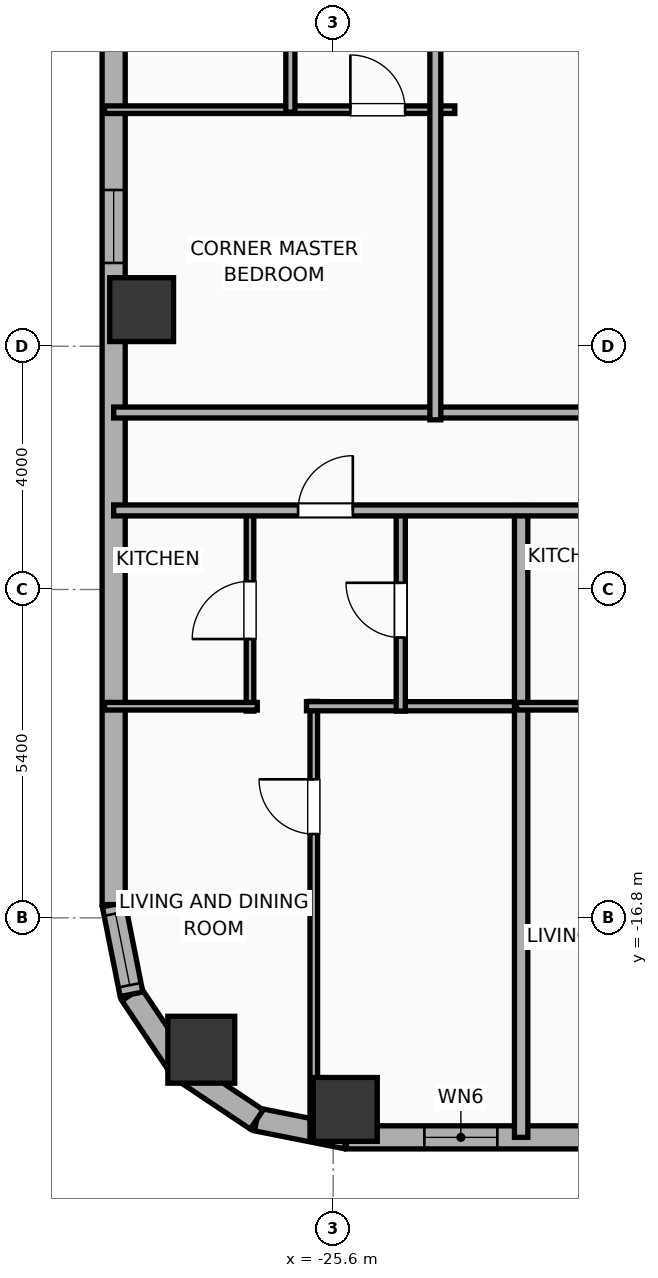
"""IFC4 building model, lengths in metres.
Left out: names, types, materials, properties, quantities, classifications, styles, units other than length and angle.
Written with IfcOpenShell. Run it as: python <this file> out.ifc"""

import sys

from ifc_helpers import new_model, si_unit, direction, frame, frame_2d, origin, origin_2d, place, context, subcontext, project, spatial, rectangle, hollow_rectangle, hollow_circle, extrude, element, fill, save


model = new_model("IFC4")
c1 = context("Model", 3, precision=1e-05, world=origin(), true_north=direction((0.0, 1.0)))
c2 = subcontext(c1, "Body", "Model", "MODEL_VIEW")
j1 = project(units=[si_unit("LENGTHUNIT", "METRE"), si_unit("PLANEANGLEUNIT", "RADIAN")], contexts=[c1])
p1 = place(None, origin())
s1 = spatial("IfcSite", under=j1, at=p1, CompositionType="ELEMENT")
p2 = place(p1, origin())
s2 = spatial("IfcBuilding", under=s1, at=p2, CompositionType="ELEMENT")
p3 = place(p2, frame((0.0, 0.0, 105.3)))
s3 = spatial("IfcBuildingStorey", under=s2, at=p3, CompositionType="ELEMENT", Elevation=105.3)
for number, where, z_axis, x_axis in (
    (1, (-25.4, -19.95, 0.0), (0.0, 0.0, 1.0), (1.0, 0.0, 0.0)),
    (2, (-28.75, -6.798, 0.0), (0.0, 0.0, 1.0), (1.0, 0.0, 0.0)),
):
    element("IfcColumn", number, at=place(p3, frame(where, z_axis=z_axis, x_axis=x_axis)), inside=s3, PredefinedType="COLUMN", context=c2, shape_type="SweptSolid", body=[
        extrude(hollow_rectangle(XDim=1.05, YDim=1.05, WallThickness=0.036, at=origin_2d()), origin(), (0.0, 0.0, 1.0), 3.9),
    ])
p4 = place(p3, frame((-27.769, -18.969, 0.0), z_axis=(0.0, 0.0, 1.0), x_axis=(1.0, 0.0, 0.0)))
e3 = element("IfcColumn", 3, at=p4, inside=s3, PredefinedType="COLUMN", context=c2, shape_type="SweptSolid", body=[
    extrude(hollow_circle(Radius=0.55, WallThickness=0.036, at=origin_2d()), origin(), (0.0, 0.0, 1.0), 3.9),
])
p5 = place(p3, frame((29.381, -20.41, 0.0), z_axis=(0.0, 0.0, 1.0), x_axis=(-1.0, 0.0, 0.0)))
e4 = element("IfcWall", 4, at=p5, inside=s3, PredefinedType="ELEMENTEDWALL", context=c2, shape_type="SweptSolid", body=[
    extrude(rectangle(XDim=54.763, YDim=0.38, at=frame_2d((27.381, 0.0))), origin(), (0.0, 0.0, 1.0), 3.65),
])
p6 = place(p5, frame((6.495, 0.0, 0.75)))
e5 = element("IfcOpeningElement", 5, at=p6, cuts=e4, PredefinedType="OPENING", context=c2, shape_type="SweptSolid", body=[
    extrude(rectangle(XDim=2.4, YDim=2.1, at=frame_2d((1.2, 1.05))), frame((0.0, 0.2, 0.0), z_axis=(0.0, -1.0, 0.0), x_axis=(1.0, 0.0, 0.0)), (0.0, 0.0, 1.0), 0.4),
])
p7 = place(p5, frame((17.686, 0.0, 0.75)))
e6 = element("IfcOpeningElement", 6, at=p7, cuts=e4, PredefinedType="OPENING", context=c2, shape_type="SweptSolid", body=[
    extrude(rectangle(XDim=2.4, YDim=2.1, at=frame_2d((1.2, 1.05))), frame((0.0, 0.2, 0.0), z_axis=(0.0, -1.0, 0.0), x_axis=(1.0, 0.0, 0.0)), (0.0, 0.0, 1.0), 0.4),
])
p8 = place(p5, frame((34.677, 0.0, 0.75)))
e7 = element("IfcOpeningElement", 7, at=p8, cuts=e4, PredefinedType="OPENING", context=c2, shape_type="SweptSolid", body=[
    extrude(rectangle(XDim=2.4, YDim=2.1, at=frame_2d((1.2, 1.05))), frame((0.0, 0.2, 0.0), z_axis=(0.0, -1.0, 0.0), x_axis=(1.0, 0.0, 0.0)), (0.0, 0.0, 1.0), 0.4),
])
p9 = place(p5, frame((45.867, 0.0, 0.75)))
e8 = element("IfcOpeningElement", 8, at=p9, cuts=e4, PredefinedType="OPENING", context=c2, shape_type="SweptSolid", body=[
    extrude(rectangle(XDim=2.4, YDim=2.1, at=frame_2d((1.2, 1.05))), frame((0.0, 0.2, 0.0), z_axis=(0.0, -1.0, 0.0), x_axis=(1.0, 0.0, 0.0)), (0.0, 0.0, 1.0), 0.4),
])
p10 = place(p5, frame((52.281, 0.0, 0.75)))
e9 = element("IfcOpeningElement", 9, at=p10, cuts=e4, PredefinedType="OPENING", context=c2, shape_type="SweptSolid", body=[
    extrude(rectangle(XDim=1.2, YDim=2.05, at=frame_2d((0.6, 1.025))), frame((0.0, 0.2, 0.0), z_axis=(0.0, -1.0, 0.0), x_axis=(1.0, 0.0, 0.0)), (0.0, 0.0, 1.0), 0.4),
])
p11 = place(p5, frame((49.641, 0.0, 0.75)))
e10 = element("IfcOpeningElement", 10, at=p11, cuts=e4, PredefinedType="OPENING", context=c2, shape_type="SweptSolid", body=[
    extrude(rectangle(XDim=1.2, YDim=2.05, at=frame_2d((0.6, 1.025))), frame((0.0, 0.2, 0.0), z_axis=(0.0, -1.0, 0.0), x_axis=(1.0, 0.0, 0.0)), (0.0, 0.0, 1.0), 0.4),
])
p12 = place(p5, frame((39.543, 0.0, 0.75)))
e11 = element("IfcOpeningElement", 11, at=p12, cuts=e4, PredefinedType="OPENING", context=c2, shape_type="SweptSolid", body=[
    extrude(rectangle(XDim=1.2, YDim=2.05, at=frame_2d((0.6, 1.025))), frame((0.0, 0.2, 0.0), z_axis=(0.0, -1.0, 0.0), x_axis=(1.0, 0.0, 0.0)), (0.0, 0.0, 1.0), 0.4),
])
p13 = place(p5, frame((44.538, 0.0, 0.75)))
e12 = element("IfcOpeningElement", 12, at=p13, cuts=e4, PredefinedType="OPENING", context=c2, shape_type="SweptSolid", body=[
    extrude(rectangle(XDim=0.52, YDim=2.05, at=frame_2d((0.26, 1.025))), frame((0.0, 0.2, 0.0), z_axis=(0.0, -1.0, 0.0), x_axis=(1.0, 0.0, 0.0)), (0.0, 0.0, 1.0), 0.4),
])
p14 = place(p5, frame((28.206, 0.0, 0.75)))
e13 = element("IfcOpeningElement", 13, at=p14, cuts=e4, PredefinedType="OPENING", context=c2, shape_type="SweptSolid", body=[
    extrude(rectangle(XDim=1.2, YDim=2.05, at=frame_2d((0.6, 1.025))), frame((0.0, 0.2, 0.0), z_axis=(0.0, -1.0, 0.0), x_axis=(1.0, 0.0, 0.0)), (0.0, 0.0, 1.0), 0.4),
])
p15 = place(p5, frame((31.241, 0.0, 0.75)))
e14 = element("IfcOpeningElement", 14, at=p15, cuts=e4, PredefinedType="OPENING", context=c2, shape_type="SweptSolid", body=[
    extrude(rectangle(XDim=0.85, YDim=2.05, at=frame_2d((0.425, 1.025))), frame((0.0, 0.2, 0.0), z_axis=(0.0, -1.0, 0.0), x_axis=(1.0, 0.0, 0.0)), (0.0, 0.0, 1.0), 0.4),
])
p16 = place(p5, frame((24.561, 0.0, 0.75)))
e15 = element("IfcOpeningElement", 15, at=p16, cuts=e4, PredefinedType="OPENING", context=c2, shape_type="SweptSolid", body=[
    extrude(rectangle(XDim=1.2, YDim=2.05, at=frame_2d((0.6, 1.025))), frame((0.0, 0.2, 0.0), z_axis=(0.0, -1.0, 0.0), x_axis=(1.0, 0.0, 0.0)), (0.0, 0.0, 1.0), 0.4),
])
p17 = place(p5, frame((22.561, 0.0, 0.75)))
e16 = element("IfcOpeningElement", 16, at=p17, cuts=e4, PredefinedType="OPENING", context=c2, shape_type="SweptSolid", body=[
    extrude(rectangle(XDim=0.52, YDim=2.05, at=frame_2d((0.26, 1.025))), frame((0.0, 0.2, 0.0), z_axis=(0.0, -1.0, 0.0), x_axis=(1.0, 0.0, 0.0)), (0.0, 0.0, 1.0), 0.4),
])
p18 = place(p5, frame((13.886, 0.0, 0.75)))
e17 = element("IfcOpeningElement", 17, at=p18, cuts=e4, PredefinedType="OPENING", context=c2, shape_type="SweptSolid", body=[
    extrude(rectangle(XDim=1.2, YDim=2.05, at=frame_2d((0.6, 1.025))), frame((0.0, 0.2, 0.0), z_axis=(0.0, -1.0, 0.0), x_axis=(1.0, 0.0, 0.0)), (0.0, 0.0, 1.0), 0.4),
])
p19 = place(p5, frame((11.694, 0.0, 0.75)))
e18 = element("IfcOpeningElement", 18, at=p19, cuts=e4, PredefinedType="OPENING", context=c2, shape_type="SweptSolid", body=[
    extrude(rectangle(XDim=0.85, YDim=2.05, at=frame_2d((0.425, 1.025))), frame((0.0, 0.2, 0.0), z_axis=(0.0, -1.0, 0.0), x_axis=(1.0, 0.0, 0.0)), (0.0, 0.0, 1.0), 0.4),
])
p20 = place(p5, frame((3.286, 0.0, 0.75)))
e19 = element("IfcOpeningElement", 19, at=p20, cuts=e4, PredefinedType="OPENING", context=c2, shape_type="SweptSolid", body=[
    extrude(rectangle(XDim=1.2, YDim=2.05, at=frame_2d((0.6, 1.025))), frame((0.0, 0.2, 0.0), z_axis=(0.0, -1.0, 0.0), x_axis=(1.0, 0.0, 0.0)), (0.0, 0.0, 1.0), 0.4),
])
p21 = place(p5, frame((0.816, 0.0, 0.75)))
e20 = element("IfcOpeningElement", 20, at=p21, cuts=e4, PredefinedType="OPENING", context=c2, shape_type="SweptSolid", body=[
    extrude(rectangle(XDim=1.2, YDim=2.05, at=frame_2d((0.6, 1.025))), frame((0.0, 0.2, 0.0), z_axis=(0.0, -1.0, 0.0), x_axis=(1.0, 0.0, 0.0)), (0.0, 0.0, 1.0), 0.4),
])
p22 = place(p3, frame((-25.381, -20.41, 0.0), z_axis=(0.0, 0.0, 1.0), x_axis=(-0.980786132421, 0.195086038585, 0.0)))
e21 = element("IfcWall", 21, at=p22, inside=s3, PredefinedType="ELEMENTEDWALL", context=c2, shape_type="SweptSolid", body=[
    extrude(rectangle(XDim=1.504, YDim=0.38, at=frame_2d((0.752, 0.0))), origin(), (0.0, 0.0, 1.0), 3.65),
])
p23 = place(p3, frame((-26.857, -20.116, 0.0), z_axis=(0.0, 0.0, 1.0), x_axis=(-0.831468045563, 0.555572577804, 0.0)))
e22 = element("IfcWall", 22, at=p23, inside=s3, PredefinedType="ELEMENTEDWALL", context=c2, shape_type="SweptSolid", body=[
    extrude(rectangle(XDim=1.485, YDim=0.38, at=frame_2d((0.742, 0.0))), origin(), (0.0, 0.0, 1.0), 3.65),
])
p24 = place(p3, frame((-28.091, -19.292, 0.0), z_axis=(0.0, 0.0, 1.0), x_axis=(-0.555610286119, 0.831442848281, 0.0)))
e23 = element("IfcWall", 23, at=p24, inside=s3, PredefinedType="ELEMENTEDWALL", context=c2, shape_type="SweptSolid", body=[
    extrude(rectangle(XDim=1.485, YDim=0.38, at=frame_2d((0.743, 0.0))), origin(), (0.0, 0.0, 1.0), 3.65),
])
p25 = place(p3, frame((-28.917, -18.057, 0.0), z_axis=(0.0, 0.0, 1.0), x_axis=(-0.195086038585, 0.980786132421, 0.0)))
e24 = element("IfcWall", 24, at=p25, inside=s3, PredefinedType="ELEMENTEDWALL", context=c2, shape_type="SweptSolid", body=[
    extrude(rectangle(XDim=1.504, YDim=0.38, at=frame_2d((0.752, 0.0))), origin(), (0.0, 0.0, 1.0), 3.65),
])
p26 = place(p25, frame((0.152, 0.0, 0.75)))
e25 = element("IfcOpeningElement", 25, at=p26, cuts=e24, PredefinedType="OPENING", context=c2, shape_type="SweptSolid", body=[
    extrude(rectangle(XDim=1.2, YDim=2.05, at=frame_2d((0.6, 1.025))), frame((0.0, 0.2, 0.0), z_axis=(0.0, -1.0, 0.0), x_axis=(1.0, 0.0, 0.0)), (0.0, 0.0, 1.0), 0.4),
])
p27 = place(p3, frame((-29.21, -16.581, 0.0), z_axis=(0.0, 0.0, 1.0), x_axis=(0.0, 1.0, 0.0)))
e26 = element("IfcWall", 26, at=p27, inside=s3, PredefinedType="ELEMENTEDWALL", context=c2, shape_type="SweptSolid", body=[
    extrude(rectangle(XDim=34.363, YDim=0.38, at=frame_2d((17.181, 0.0))), origin(), (0.0, 0.0, 1.0), 3.65),
])
p28 = place(p27, frame((31.087, 0.0, 0.75)))
e27 = element("IfcOpeningElement", 27, at=p28, cuts=e26, PredefinedType="OPENING", context=c2, shape_type="SweptSolid", body=[
    extrude(rectangle(XDim=1.2, YDim=2.05, at=frame_2d((0.6, 1.025))), frame((0.0, 0.2, 0.0), z_axis=(0.0, -1.0, 0.0), x_axis=(1.0, 0.0, 0.0)), (0.0, 0.0, 1.0), 0.4),
])
p29 = place(p27, frame((21.626, 0.0, 0.75)))
e28 = element("IfcOpeningElement", 28, at=p29, cuts=e26, PredefinedType="OPENING", context=c2, shape_type="SweptSolid", body=[
    extrude(rectangle(XDim=1.2, YDim=2.05, at=frame_2d((0.6, 1.025))), frame((0.0, 0.2, 0.0), z_axis=(0.0, -1.0, 0.0), x_axis=(1.0, 0.0, 0.0)), (0.0, 0.0, 1.0), 0.4),
])
p30 = place(p27, frame((10.551, 0.0, 0.75)))
e29 = element("IfcOpeningElement", 29, at=p30, cuts=e26, PredefinedType="OPENING", context=c2, shape_type="SweptSolid", body=[
    extrude(rectangle(XDim=1.2, YDim=2.05, at=frame_2d((0.6, 1.025))), frame((0.0, 0.2, 0.0), z_axis=(0.0, -1.0, 0.0), x_axis=(1.0, 0.0, 0.0)), (0.0, 0.0, 1.0), 0.4),
])
p31 = place(p3, frame((-29.21, -8.49, 0.0), z_axis=(0.0, 0.0, 1.0), x_axis=(1.0, 0.0, 0.0)))
e30 = element("IfcWall", 30, at=p31, inside=s3, PredefinedType="PARTITIONING", context=c2, shape_type="SweptSolid", body=[
    extrude(rectangle(XDim=19.33, YDim=0.18, at=frame_2d((9.665, 0.0))), origin(), (0.0, 0.0, 1.0), 3.65),
])
p32 = place(p3, frame((-25.919, -20.456, 0.0), z_axis=(0.0, 0.0, 1.0), x_axis=(0.0, 1.0, 0.0)))
e31 = element("IfcWall", 31, at=p32, inside=s3, PredefinedType="PARTITIONING", context=c2, shape_type="SweptSolid", body=[
    extrude(rectangle(XDim=7.216, YDim=0.125, at=frame_2d((3.608, 0.0))), origin(), (0.0, 0.0, 1.0), 3.65),
])
p33 = place(p32, frame((5.034, 0.0, 0.0)))
e32 = element("IfcOpeningElement", 32, at=p33, cuts=e31, PredefinedType="OPENING", context=c2, shape_type="SweptSolid", body=[
    extrude(rectangle(XDim=0.9, YDim=2.05, at=frame_2d((0.45, 1.025))), frame((0.0, 0.073, 0.0), z_axis=(0.0, -1.0, 0.0), x_axis=(1.0, 0.0, 0.0)), (0.0, 0.0, 1.0), 0.145),
])
p34 = place(p3, frame((-26.039, -13.32, 0.0), z_axis=(0.0, 0.0, 1.0), x_axis=(1.0, 0.0, 0.0)))
e33 = element("IfcWall", 33, at=p34, inside=s3, PredefinedType="PLUMBINGWALL", context=c2, shape_type="SweptSolid", body=[
    extrude(rectangle(XDim=3.605, YDim=0.15, at=frame_2d((1.802, 0.0))), origin(), (0.0, 0.0, 1.0), 3.65),
])
p35 = place(p3, frame((-26.968, -13.4, 0.0), z_axis=(0.0, 0.0, 1.0), x_axis=(0.0, 1.0, 0.0)))
e34 = element("IfcWall", 34, at=p35, inside=s3, PredefinedType="PARTITIONING", context=c2, shape_type="SweptSolid", body=[
    extrude(rectangle(XDim=3.32, YDim=0.125, at=frame_2d((1.66, 0.0))), origin(), (0.0, 0.0, 1.0), 3.65),
])
p36 = place(p35, frame((1.185, 0.0, 0.0)))
e35 = element("IfcOpeningElement", 35, at=p36, cuts=e34, PredefinedType="OPENING", context=c2, shape_type="SweptSolid", body=[
    extrude(rectangle(XDim=0.95, YDim=2.05, at=frame_2d((0.475, 1.025))), frame((0.0, 0.073, 0.0), z_axis=(0.0, -1.0, 0.0), x_axis=(1.0, 0.0, 0.0)), (0.0, 0.0, 1.0), 0.145),
])
p37 = place(p3, frame((-29.36, -13.32, 0.0), z_axis=(0.0, 0.0, 1.0), x_axis=(1.0, 0.0, 0.0)))
e36 = element("IfcWall", 36, at=p37, inside=s3, PredefinedType="PARTITIONING", context=c2, shape_type="SweptSolid", body=[
    extrude(rectangle(XDim=2.512, YDim=0.125, at=frame_2d((1.256, 0.0))), origin(), (0.0, 0.0, 1.0), 3.65),
])
p38 = place(p3, frame((-24.489, -13.4, 0.0), z_axis=(0.0, 0.0, 1.0), x_axis=(0.0, 1.0, 0.0)))
e37 = element("IfcWall", 37, at=p38, inside=s3, PredefinedType="PLUMBINGWALL", context=c2, shape_type="SweptSolid", body=[
    extrude(rectangle(XDim=3.32, YDim=0.15, at=frame_2d((1.66, 0.0))), origin(), (0.0, 0.0, 1.0), 3.65),
])
p39 = place(p38, frame((1.21, 0.0, 0.0)))
e38 = element("IfcOpeningElement", 38, at=p39, cuts=e37, PredefinedType="OPENING", context=c2, shape_type="SweptSolid", body=[
    extrude(rectangle(XDim=0.9, YDim=2.05, at=frame_2d((0.45, 1.025))), frame((0.0, 0.085, 0.0), z_axis=(0.0, -1.0, 0.0), x_axis=(1.0, 0.0, 0.0)), (0.0, 0.0, 1.0), 0.17),
])
p40 = place(p3, frame((-22.509, -20.41, 0.0), z_axis=(0.0, 0.0, 1.0), x_axis=(0.0, 1.0, 0.0)))
e39 = element("IfcWall", 39, at=p40, inside=s3, PredefinedType="PARTITIONING", context=c2, shape_type="SweptSolid", body=[
    extrude(rectangle(XDim=10.39, YDim=0.22, at=frame_2d((5.195, 0.0))), origin(), (0.0, 0.0, 1.0), 3.65),
])
p41 = place(p3, frame((-22.584, -13.32, 0.0), z_axis=(0.0, 0.0, 1.0), x_axis=(1.0, 0.0, 0.0)))
e40 = element("IfcWall", 40, at=p41, inside=s3, PredefinedType="PARTITIONING", context=c2, shape_type="SweptSolid", body=[
    extrude(rectangle(XDim=2.505, YDim=0.125, at=frame_2d((1.252, 0.0))), origin(), (0.0, 0.0, 1.0), 3.65),
])
p42 = place(p3, frame((-29.21, -10.1, 0.0), z_axis=(0.0, 0.0, 1.0), x_axis=(1.0, 0.0, 0.0)))
e41 = element("IfcWall", 41, at=p42, inside=s3, PredefinedType="PARTITIONING", context=c2, shape_type="SweptSolid", body=[
    extrude(rectangle(XDim=62.42, YDim=0.18, at=frame_2d((31.21, 0.0))), origin(), (0.0, 0.0, 1.0), 3.65),
])
p43 = place(p42, frame((3.033, 0.0, 0.0)))
e42 = element("IfcOpeningElement", 42, at=p43, cuts=e41, PredefinedType="OPENING", context=c2, shape_type="SweptSolid", body=[
    extrude(rectangle(XDim=0.9, YDim=2.05, at=frame_2d((0.45, 1.025))), frame((0.0, 0.1, 0.0), z_axis=(0.0, -1.0, 0.0), x_axis=(1.0, 0.0, 0.0)), (0.0, 0.0, 1.0), 0.2),
])
p44 = place(p42, frame((9.768, 0.0, 0.0)))
e43 = element("IfcOpeningElement", 43, at=p44, cuts=e41, PredefinedType="OPENING", context=c2, shape_type="SweptSolid", body=[
    extrude(rectangle(XDim=0.9, YDim=2.05, at=frame_2d((0.45, 1.025))), frame((0.0, 0.1, 0.0), z_axis=(0.0, -1.0, 0.0), x_axis=(1.0, 0.0, 0.0)), (0.0, 0.0, 1.0), 0.2),
])
p45 = place(p42, frame((18.65, 0.0, 0.0)))
e44 = element("IfcOpeningElement", 44, at=p45, cuts=e41, PredefinedType="OPENING", context=c2, shape_type="SweptSolid", body=[
    extrude(rectangle(XDim=1.15, YDim=2.05, at=frame_2d((0.575, 1.025))), frame((0.0, 0.1, 0.0), z_axis=(0.0, -1.0, 0.0), x_axis=(1.0, 0.0, 0.0)), (0.0, 0.0, 1.0), 0.2),
])
p46 = place(p42, frame((29.212, 0.0, 0.0)))
e45 = element("IfcOpeningElement", 45, at=p46, cuts=e41, PredefinedType="OPENING", context=c2, shape_type="SweptSolid", body=[
    extrude(rectangle(XDim=1.15, YDim=2.05, at=frame_2d((0.575, 1.025))), frame((0.0, 0.1, 0.0), z_axis=(0.0, -1.0, 0.0), x_axis=(1.0, 0.0, 0.0)), (0.0, 0.0, 1.0), 0.2),
])
p47 = place(p42, frame((40.379, 0.0, 0.0)))
e46 = element("IfcOpeningElement", 46, at=p47, cuts=e41, PredefinedType="OPENING", context=c2, shape_type="SweptSolid", body=[
    extrude(rectangle(XDim=1.15, YDim=2.05, at=frame_2d((0.575, 1.025))), frame((0.0, 0.1, 0.0), z_axis=(0.0, -1.0, 0.0), x_axis=(1.0, 0.0, 0.0)), (0.0, 0.0, 1.0), 0.2),
])
p48 = place(p42, frame((50.959, 0.0, 0.0)))
e47 = element("IfcOpeningElement", 47, at=p48, cuts=e41, PredefinedType="OPENING", context=c2, shape_type="SweptSolid", body=[
    extrude(rectangle(XDim=1.15, YDim=2.05, at=frame_2d((0.575, 1.025))), frame((0.0, 0.1, 0.0), z_axis=(0.0, -1.0, 0.0), x_axis=(1.0, 0.0, 0.0)), (0.0, 0.0, 1.0), 0.2),
])
p49 = place(p42, frame((59.117, 0.0, 0.0)))
e48 = element("IfcOpeningElement", 48, at=p49, cuts=e41, PredefinedType="OPENING", context=c2, shape_type="SweptSolid", body=[
    extrude(rectangle(XDim=0.9, YDim=2.05, at=frame_2d((0.45, 1.025))), frame((0.0, 0.1, 0.0), z_axis=(0.0, -1.0, 0.0), x_axis=(1.0, 0.0, 0.0)), (0.0, 0.0, 1.0), 0.2),
])
p50 = place(p3, frame((-29.36, -3.51, 0.0), z_axis=(0.0, 0.0, 1.0), x_axis=(1.0, 0.0, 0.0)))
e49 = element("IfcWall", 49, at=p50, inside=s3, PredefinedType="PARTITIONING", context=c2, shape_type="SweptSolid", body=[
    extrude(rectangle(XDim=5.76, YDim=0.125, at=frame_2d((2.88, 0.0))), origin(), (0.0, 0.0, 1.0), 3.65),
])
p51 = place(p50, frame((4.043, 0.0, 0.0)))
e50 = element("IfcOpeningElement", 50, at=p51, cuts=e49, PredefinedType="OPENING", context=c2, shape_type="SweptSolid", body=[
    extrude(rectangle(XDim=0.9, YDim=2.05, at=frame_2d((0.45, 1.025))), frame((0.0, 0.073, 0.0), z_axis=(0.0, -1.0, 0.0), x_axis=(1.0, 0.0, 0.0)), (0.0, 0.0, 1.0), 0.145),
])
p52 = place(p3, frame((-26.304, -3.55, 0.0), z_axis=(0.0, 0.0, 1.0), x_axis=(0.0, 1.0, 0.0)))
e51 = element("IfcWall", 51, at=p52, inside=s3, PredefinedType="PLUMBINGWALL", context=c2, shape_type="SweptSolid", body=[
    extrude(rectangle(XDim=3.33, YDim=0.15, at=frame_2d((1.665, 0.0))), origin(), (0.0, 0.0, 1.0), 3.65),
])
p53 = place(p52, frame((1.215, 0.0, 0.0)))
e52 = element("IfcOpeningElement", 52, at=p53, cuts=e51, PredefinedType="OPENING", context=c2, shape_type="SweptSolid", body=[
    extrude(rectangle(XDim=0.9, YDim=2.05, at=frame_2d((0.45, 1.025))), frame((0.0, 0.085, 0.0), z_axis=(0.0, -1.0, 0.0), x_axis=(1.0, 0.0, 0.0)), (0.0, 0.0, 1.0), 0.17),
])
p54 = place(p3, frame((-23.92, -8.61, 0.0), z_axis=(0.0, 0.0, 1.0), x_axis=(0.0, 1.0, 0.0)))
e53 = element("IfcWall", 53, at=p54, inside=s3, PredefinedType="PARTITIONING", context=c2, shape_type="SweptSolid", body=[
    extrude(rectangle(XDim=17.22, YDim=0.18, at=frame_2d((8.61, 0.0))), origin(), (0.0, 0.0, 1.0), 3.65),
])
p55 = place(p26, origin())
e54 = element("IfcWindow", 54, at=p55, inside=s3, PartitioningType="SINGLE_PANEL", PredefinedType="WINDOW", context=c2, shape_type="SweptSolid", body=[
    extrude(rectangle(XDim=1.2, YDim=2.05, at=frame_2d((0.6, 1.025))), frame((0.0, 0.03, 0.0), z_axis=(0.0, -1.0, 0.0), x_axis=(1.0, 0.0, 0.0)), (0.0, 0.0, 1.0), 0.06),
])
fill(e25, e54)
p56 = place(p10, origin())
e55 = element("IfcWindow", 55, at=p56, inside=s3, PartitioningType="SINGLE_PANEL", PredefinedType="WINDOW", context=c2, shape_type="SweptSolid", body=[
    extrude(rectangle(XDim=1.2, YDim=2.05, at=frame_2d((0.6, 1.025))), frame((0.0, 0.03, 0.0), z_axis=(0.0, -1.0, 0.0), x_axis=(1.0, 0.0, 0.0)), (0.0, 0.0, 1.0), 0.06),
])
fill(e9, e55)
p57 = place(p30, origin())
e56 = element("IfcWindow", 56, at=p57, inside=s3, PartitioningType="SINGLE_PANEL", PredefinedType="WINDOW", context=c2, shape_type="SweptSolid", body=[
    extrude(rectangle(XDim=1.2, YDim=2.05, at=frame_2d((0.6, 1.025))), frame((0.0, 0.03, 0.0), z_axis=(0.0, -1.0, 0.0), x_axis=(1.0, 0.0, 0.0)), (0.0, 0.0, 1.0), 0.06),
])
fill(e29, e56)
p58 = place(p33, origin())
e57 = element("IfcDoor", 57, at=p58, inside=s3, OperationType="SINGLE_SWING_RIGHT", PredefinedType="DOOR", context=c2, shape_type="SweptSolid", body=[
    extrude(rectangle(XDim=0.9, YDim=2.05, at=frame_2d((0.45, 1.025))), frame((0.0, 0.025, 0.0), z_axis=(0.0, -1.0, 0.0), x_axis=(1.0, 0.0, 0.0)), (0.0, 0.0, 1.0), 0.05),
])
fill(e32, e57)
p59 = place(p36, origin())
e58 = element("IfcDoor", 58, at=p59, inside=s3, OperationType="SINGLE_SWING_LEFT", PredefinedType="DOOR", context=c2, shape_type="SweptSolid", body=[
    extrude(rectangle(XDim=0.95, YDim=2.05, at=frame_2d((0.475, 1.025))), frame((0.0, 0.025, 0.0), z_axis=(0.0, -1.0, 0.0), x_axis=(1.0, 0.0, 0.0)), (0.0, 0.0, 1.0), 0.05),
])
fill(e35, e58)
p60 = place(p39, origin())
e59 = element("IfcDoor", 59, at=p60, inside=s3, OperationType="SINGLE_SWING_RIGHT", PredefinedType="DOOR", context=c2, shape_type="SweptSolid", body=[
    extrude(rectangle(XDim=0.9, YDim=2.05, at=frame_2d((0.45, 1.025))), frame((0.0, 0.025, 0.0), z_axis=(0.0, -1.0, 0.0), x_axis=(1.0, 0.0, 0.0)), (0.0, 0.0, 1.0), 0.05),
])
fill(e38, e59)
p61 = place(p43, origin())
e60 = element("IfcDoor", 60, at=p61, inside=s3, OperationType="SINGLE_SWING_RIGHT", PredefinedType="DOOR", context=c2, shape_type="SweptSolid", body=[
    extrude(rectangle(XDim=0.9, YDim=2.05, at=frame_2d((0.45, 1.025))), frame((0.0, 0.025, 0.0), z_axis=(0.0, -1.0, 0.0), x_axis=(1.0, 0.0, 0.0)), (0.0, 0.0, 1.0), 0.05),
])
fill(e42, e60)
p62 = place(p51, origin())
e61 = element("IfcDoor", 61, at=p62, inside=s3, OperationType="SINGLE_SWING_LEFT", PredefinedType="DOOR", context=c2, shape_type="SweptSolid", body=[
    extrude(rectangle(XDim=0.9, YDim=2.05, at=frame_2d((0.45, 1.025))), frame((0.0, 0.025, 0.0), z_axis=(0.0, -1.0, 0.0), x_axis=(1.0, 0.0, 0.0)), (0.0, 0.0, 1.0), 0.05),
])
fill(e50, e61)
save(model, sys.argv[1])
